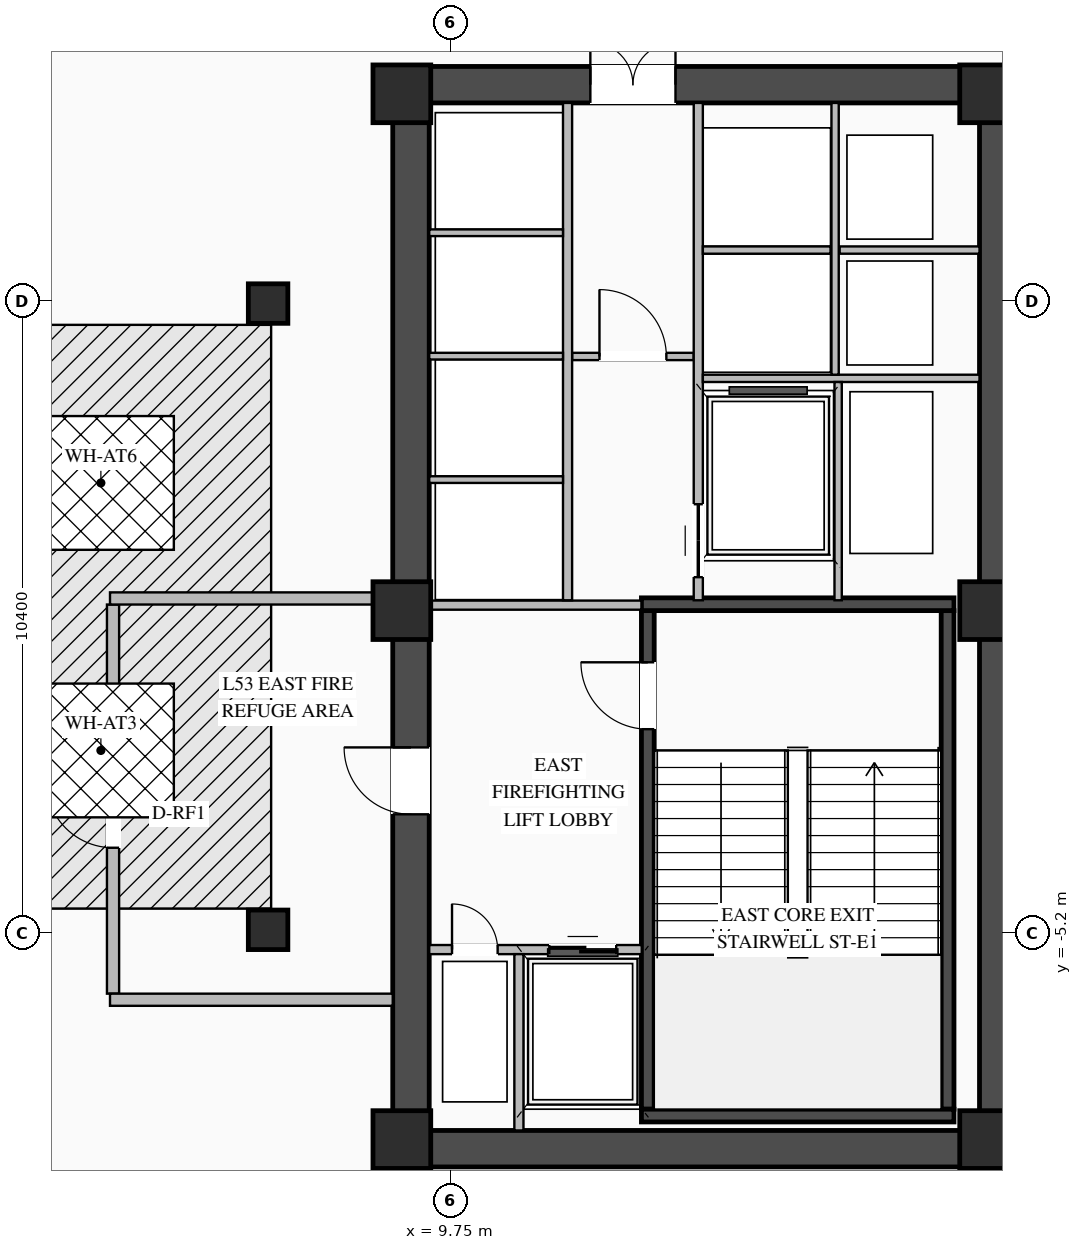
"""IFC4 building model, lengths in metres.
Left out: names, types, materials, properties, quantities, classifications, styles, units other than length and angle.
Written with IfcOpenShell. Run it as: python <this file> out.ifc"""

import sys

from ifc_helpers import new_model, si_unit, direction, frame, frame_2d, origin, origin_2d, place, context, subcontext, project, spatial, rectangle, i_section, extrude, element, fill, save


model = new_model("IFC4")
c1 = context("Model", 3, precision=1e-05, world=origin(), true_north=direction((0.0, 1.0)))
c2 = subcontext(c1, "Body", "Model", "MODEL_VIEW")
j1 = project(units=[si_unit("LENGTHUNIT", "METRE"), si_unit("PLANEANGLEUNIT", "RADIAN")], contexts=[c1])
p1 = place(None, origin())
s1 = spatial("IfcSite", under=j1, at=p1, CompositionType="ELEMENT")
p2 = place(p1, origin())
s2 = spatial("IfcBuilding", under=s1, at=p2, CompositionType="ELEMENT")
p3 = place(p2, frame((0.0, 0.0, 194.9)))
s3 = spatial("IfcBuildingStorey", under=s2, at=p3, CompositionType="ELEMENT", Elevation=194.9)
p4 = place(p3, frame((8.8, -8.75, 0.0), z_axis=(0.0, 0.0, 1.0), x_axis=(1.0, 0.0, 0.0)))
e1 = element("IfcWall", 1, at=p4, inside=s3, PredefinedType="SHEAR", context=c2, shape_type="SweptSolid", body=[
    extrude(rectangle(XDim=10.25, YDim=0.6, at=frame_2d((5.125, 0.0))), origin(), (0.0, 0.0, 1.0), 4.32),
])
p5 = place(p3, frame((8.8, 8.75, 0.0), z_axis=(0.0, 0.0, 1.0), x_axis=(1.0, 0.0, 0.0)))
e2 = element("IfcWall", 2, at=p5, inside=s3, PredefinedType="SHEAR", context=c2, shape_type="SweptSolid", body=[
    extrude(rectangle(XDim=10.25, YDim=0.6, at=frame_2d((5.125, 0.0))), origin(), (0.0, 0.0, 1.0), 4.32),
])
p6 = place(p5, frame((3.25, 0.0, 0.0)))
e3 = element("IfcOpeningElement", 3, at=p6, cuts=e2, PredefinedType="OPENING", context=c2, shape_type="SweptSolid", body=[
    extrude(rectangle(XDim=1.4, YDim=2.05, at=frame_2d((0.7, 1.025))), frame((0.0, 0.31, 0.0), z_axis=(0.0, -1.0, 0.0), x_axis=(1.0, 0.0, 0.0)), (0.0, 0.0, 1.0), 0.62),
])
p7 = place(p3, frame((9.1, -8.45, 0.0), z_axis=(0.0, 0.0, 1.0), x_axis=(0.0, 1.0, 0.0)))
e4 = element("IfcWall", 4, at=p7, inside=s3, PredefinedType="SHEAR", context=c2, shape_type="SweptSolid", body=[
    extrude(rectangle(XDim=16.9, YDim=0.6, at=frame_2d((8.45, 0.0))), origin(), (0.0, 0.0, 1.0), 4.32),
])
p8 = place(p7, frame((5.2, 0.0, 0.0)))
e5 = element("IfcOpeningElement", 5, at=p8, cuts=e4, PredefinedType="OPENING", context=c2, shape_type="SweptSolid", body=[
    extrude(rectangle(XDim=1.1, YDim=2.08, at=frame_2d((0.55, 1.04))), frame((0.0, 0.31, 0.0), z_axis=(0.0, -1.0, 0.0), x_axis=(1.0, 0.0, 0.0)), (0.0, 0.0, 1.0), 0.62),
])
p9 = place(p3, frame((18.75, -8.45, 0.0), z_axis=(0.0, 0.0, 1.0), x_axis=(0.0, 1.0, 0.0)))
e6 = element("IfcWall", 6, at=p9, inside=s3, PredefinedType="SHEAR", context=c2, shape_type="SweptSolid", body=[
    extrude(rectangle(XDim=16.9, YDim=0.6, at=frame_2d((8.45, 0.0))), origin(), (0.0, 0.0, 1.0), 4.32),
])
p10 = place(p3, frame((12.995, -8.1, 0.0), z_axis=(0.0, 0.0, 1.0), x_axis=(0.0, 1.0, 0.0)))
e7 = element("IfcWall", 7, at=p10, inside=s3, PredefinedType="SHEAR", context=c2, shape_type="SweptSolid", body=[
    extrude(rectangle(XDim=8.2, YDim=0.21, at=frame_2d((4.1, 0.0))), origin(), (0.0, 0.0, 1.0), 4.32),
])
p11 = place(p10, frame((6.25, 0.0, 0.0)))
e8 = element("IfcOpeningElement", 8, at=p11, cuts=e7, PredefinedType="OPENING", context=c2, shape_type="SweptSolid", body=[
    extrude(rectangle(XDim=1.1, YDim=2.15, at=frame_2d((0.55, 1.075))), frame((0.0, 0.115, 0.0), z_axis=(0.0, -1.0, 0.0), x_axis=(1.0, 0.0, 0.0)), (0.0, 0.0, 1.0), 0.23),
])
p12 = place(p3, frame((17.925, -8.1, 0.0), z_axis=(0.0, 0.0, 1.0), x_axis=(0.0, 1.0, 0.0)))
e9 = element("IfcWall", 9, at=p12, inside=s3, PredefinedType="SHEAR", context=c2, shape_type="SweptSolid", body=[
    extrude(rectangle(XDim=8.2, YDim=0.21, at=frame_2d((4.1, 0.0))), origin(), (0.0, 0.0, 1.0), 4.32),
])
for number, where, z_axis, x_axis in (
    (10, (12.89, -8.205, 0.0), (0.0, 0.0, 1.0), (1.0, 0.0, 0.0)),
    (11, (18.03, 0.205, 0.0), (0.0, 0.0, 1.0), (-1.0, 0.0, 0.0)),
):
    element("IfcWall", number, at=place(p3, frame(where, z_axis=z_axis, x_axis=x_axis)), inside=s3, PredefinedType="SHEAR", context=c2, shape_type="SweptSolid", body=[
        extrude(rectangle(XDim=5.14, YDim=0.21, at=frame_2d((2.57, 0.0))), origin(), (0.0, 0.0, 1.0), 4.32),
    ])
for number, where, z_axis, x_axis in (
    (12, (8.95, -8.6, 0.0), (0.0, 0.0, 1.0), (1.0, 0.0, 0.0)),
    (13, (8.95, 0.1, 0.0), (0.0, 0.0, 1.0), (1.0, 0.0, 0.0)),
    (14, (8.95, 8.6, 0.0), (0.0, 0.0, 1.0), (1.0, 0.0, 0.0)),
    (15, (18.6, -8.6, 0.0), (0.0, 0.0, 1.0), (1.0, 0.0, 0.0)),
    (16, (18.6, 0.1, 0.0), (0.0, 0.0, 1.0), (1.0, 0.0, 0.0)),
    (17, (18.6, 8.6, 0.0), (0.0, 0.0, 1.0), (1.0, 0.0, 0.0)),
):
    element("IfcColumn", number, at=place(p3, frame(where, z_axis=z_axis, x_axis=x_axis)), inside=s3, PredefinedType="COLUMN", context=c2, shape_type="SweptSolid", body=[
        extrude(rectangle(XDim=0.95, YDim=0.95, at=origin_2d()), origin(), (0.0, 0.0, 1.0), 4.6),
    ])
for number, where, z_axis, x_axis in (
    (18, (6.75, -5.15, 0.0), (0.0, 0.0, 1.0), (1.0, 0.0, 0.0)),
    (19, (6.75, 5.15, 0.0), (0.0, 0.0, 1.0), (1.0, 0.0, 0.0)),
):
    element("IfcColumn", number, at=place(p3, frame(where, z_axis=z_axis, x_axis=x_axis)), inside=s3, PredefinedType="COLUMN", context=c2, shape_type="SweptSolid", body=[
        extrude(i_section(OverallWidth=0.65, OverallDepth=0.65, WebThickness=0.028, FlangeThickness=0.04, at=origin_2d()), origin(), (0.0, 0.0, 1.0), 4.6),
    ])
p13 = place(p3, frame((9.4, -5.475, 0.0), z_axis=(0.0, 0.0, 1.0), x_axis=(1.0, 0.0, 0.0)))
e20 = element("IfcWall", 20, at=p13, inside=s3, PredefinedType="STANDARD", context=c2, shape_type="SweptSolid", body=[
    extrude(rectangle(XDim=3.495, YDim=0.15, at=frame_2d((1.748, 0.0))), origin(), (0.0, 0.0, 1.0), 4.3),
])
p14 = place(p13, frame((1.975, 0.0, 0.0)))
e21 = element("IfcOpeningElement", 21, at=p14, cuts=e20, PredefinedType="OPENING", context=c2, shape_type="SweptSolid", body=[
    extrude(rectangle(XDim=1.1, YDim=2.15, at=frame_2d((0.55, 1.075))), frame((0.0, 0.085, 0.0), z_axis=(0.0, -1.0, 0.0), x_axis=(1.0, 0.0, 0.0)), (0.0, 0.0, 1.0), 0.17),
])
p15 = place(p13, frame((0.375, 0.0, 0.0)))
e22 = element("IfcOpeningElement", 22, at=p15, cuts=e20, PredefinedType="OPENING", context=c2, shape_type="SweptSolid", body=[
    extrude(rectangle(XDim=0.75, YDim=2.05, at=frame_2d((0.375, 1.025))), frame((0.0, 0.085, 0.0), z_axis=(0.0, -1.0, 0.0), x_axis=(1.0, 0.0, 0.0)), (0.0, 0.0, 1.0), 0.17),
])
p16 = place(p3, frame((10.875, -8.45, 0.0), z_axis=(0.0, 0.0, 1.0), x_axis=(0.0, 1.0, 0.0)))
e23 = element("IfcWall", 23, at=p16, inside=s3, PredefinedType="STANDARD", context=c2, shape_type="SweptSolid", body=[
    extrude(rectangle(XDim=2.9, YDim=0.15, at=frame_2d((1.45, 0.0))), origin(), (0.0, 0.0, 1.0), 4.3),
])
p17 = place(p3, frame((9.4, 0.19, 0.0), z_axis=(0.0, 0.0, 1.0), x_axis=(1.0, 0.0, 0.0)))
e24 = element("IfcWall", 24, at=p17, inside=s3, PredefinedType="STANDARD", context=c2, shape_type="SweptSolid", body=[
    extrude(rectangle(XDim=3.49, YDim=0.15, at=frame_2d((1.745, 0.0))), origin(), (0.0, 0.0, 1.0), 3.695),
])
p18 = place(p3, frame((11.75, 4.28, 0.0), z_axis=(0.0, 0.0, 1.0), x_axis=(1.0, 0.0, 0.0)))
e25 = element("IfcWall", 25, at=p18, inside=s3, PredefinedType="STANDARD", context=c2, shape_type="SweptSolid", body=[
    extrude(rectangle(XDim=2.0, YDim=0.12, at=frame_2d((1.0, 0.0))), origin(), (0.0, 0.0, 1.0), 4.3),
])
p19 = place(p18, frame((0.45, 0.0, 0.0)))
e26 = element("IfcOpeningElement", 26, at=p19, cuts=e25, PredefinedType="OPENING", context=c2, shape_type="SweptSolid", body=[
    extrude(rectangle(XDim=1.1, YDim=2.1, at=frame_2d((0.55, 1.05))), frame((0.0, 0.07, 0.0), z_axis=(0.0, -1.0, 0.0), x_axis=(1.0, 0.0, 0.0)), (0.0, 0.0, 1.0), 0.14),
])
p20 = place(p3, frame((11.675, 0.27, 0.0), z_axis=(0.0, 0.0, 1.0), x_axis=(0.0, 1.0, 0.0)))
e27 = element("IfcWall", 27, at=p20, inside=s3, PredefinedType="STANDARD", context=c2, shape_type="SweptSolid", body=[
    extrude(rectangle(XDim=8.18, YDim=0.15, at=frame_2d((4.09, 0.0))), origin(), (0.0, 0.0, 1.0), 4.3),
])
for number, where, z_axis, x_axis in (
    (28, (9.4, 2.255, 0.0), (0.0, 0.0, 1.0), (1.0, 0.0, 0.0)),
    (29, (9.4, 4.285, 0.0), (0.0, 0.0, 1.0), (1.0, 0.0, 0.0)),
    (30, (9.4, 6.315, 0.0), (0.0, 0.0, 1.0), (1.0, 0.0, 0.0)),
):
    element("IfcWall", number, at=place(p3, frame(where, z_axis=z_axis, x_axis=x_axis)), inside=s3, PredefinedType="STANDARD", context=c2, shape_type="SweptSolid", body=[
        extrude(rectangle(XDim=2.2, YDim=0.11, at=frame_2d((1.1, 0.0))), origin(), (0.0, 0.0, 1.0), 4.3),
    ])
p21 = place(p3, frame((13.825, 0.27, 0.0), z_axis=(0.0, 0.0, 1.0), x_axis=(0.0, 1.0, 0.0)))
e31 = element("IfcWall", 31, at=p21, inside=s3, PredefinedType="STANDARD", context=c2, shape_type="SweptSolid", body=[
    extrude(rectangle(XDim=8.18, YDim=0.15, at=frame_2d((4.09, 0.0))), origin(), (0.0, 0.0, 1.0), 4.3),
])
p22 = place(p21, frame((0.38, 0.0, 0.0)))
e32 = element("IfcOpeningElement", 32, at=p22, cuts=e31, PredefinedType="OPENING", context=c2, shape_type="SweptSolid", body=[
    extrude(rectangle(XDim=1.2, YDim=2.1, at=frame_2d((0.6, 1.05))), frame((0.0, 0.085, 0.0), z_axis=(0.0, -1.0, 0.0), x_axis=(1.0, 0.0, 0.0)), (0.0, 0.0, 1.0), 0.17),
])
p23 = place(p3, frame((13.9, 3.92, 0.0), z_axis=(0.0, 0.0, 1.0), x_axis=(1.0, 0.0, 0.0)))
e33 = element("IfcWall", 33, at=p23, inside=s3, PredefinedType="STANDARD", context=c2, shape_type="SweptSolid", body=[
    extrude(rectangle(XDim=4.55, YDim=0.12, at=frame_2d((2.275, 0.0))), origin(), (0.0, 0.0, 1.0), 4.3),
])
p24 = place(p3, frame((16.15, 6.03, 0.0), z_axis=(0.0, 0.0, 1.0), x_axis=(1.0, 0.0, 0.0)))
e34 = element("IfcWall", 34, at=p24, inside=s3, PredefinedType="STANDARD", context=c2, shape_type="SweptSolid", body=[
    extrude(rectangle(XDim=2.3, YDim=0.12, at=frame_2d((1.15, 0.0))), origin(), (0.0, 0.0, 1.0), 4.3),
])
p25 = place(p3, frame((16.075, 3.98, 0.0), z_axis=(0.0, 0.0, 1.0), x_axis=(0.0, 1.0, 0.0)))
e35 = element("IfcWall", 35, at=p25, inside=s3, PredefinedType="STANDARD", context=c2, shape_type="SweptSolid", body=[
    extrude(rectangle(XDim=4.47, YDim=0.12, at=frame_2d((2.235, 0.0))), origin(), (0.0, 0.0, 1.0), 4.3),
])
p26 = place(p3, frame((13.9, 6.03, 0.0), z_axis=(0.0, 0.0, 1.0), x_axis=(1.0, 0.0, 0.0)))
e36 = element("IfcWall", 36, at=p26, inside=s3, PredefinedType="STANDARD", context=c2, shape_type="SweptSolid", body=[
    extrude(rectangle(XDim=2.1, YDim=0.12, at=frame_2d((1.05, 0.0))), origin(), (0.0, 0.0, 1.0), 4.3),
])
p27 = place(p3, frame((16.125, 0.27, 0.0), z_axis=(0.0, 0.0, 1.0), x_axis=(0.0, 1.0, 0.0)))
e37 = element("IfcWall", 37, at=p27, inside=s3, PredefinedType="STANDARD", context=c2, shape_type="SweptSolid", body=[
    extrude(rectangle(XDim=3.59, YDim=0.12, at=frame_2d((1.795, 0.0))), origin(), (0.0, 0.0, 1.0), 4.3),
])
p28 = place(p3, frame((4.2, -6.2, 0.0), z_axis=(0.0, 0.0, 1.0), x_axis=(0.0, 1.0, 0.0)))
e38 = element("IfcWall", 38, at=p28, inside=s3, PredefinedType="STANDARD", context=c2, shape_type="SweptSolid", body=[
    extrude(rectangle(XDim=6.4, YDim=0.2, at=frame_2d((3.2, 0.0))), origin(), (0.0, 0.0, 1.0), 4.3),
])
p29 = place(p28, frame((2.4, 0.0, 0.0)))
e39 = element("IfcOpeningElement", 39, at=p29, cuts=e38, PredefinedType="OPENING", context=c2, shape_type="SweptSolid", body=[
    extrude(rectangle(XDim=1.1, YDim=2.08, at=frame_2d((0.55, 1.04))), frame((0.0, 0.11, 0.0), z_axis=(0.0, -1.0, 0.0), x_axis=(1.0, 0.0, 0.0)), (0.0, 0.0, 1.0), 0.22),
])
p30 = place(p3, frame((4.15, -6.3, 0.0), z_axis=(0.0, 0.0, 1.0), x_axis=(1.0, 0.0, 0.0)))
e40 = element("IfcWall", 40, at=p30, inside=s3, PredefinedType="STANDARD", context=c2, shape_type="SweptSolid", body=[
    extrude(rectangle(XDim=4.65, YDim=0.2, at=frame_2d((2.325, 0.0))), origin(), (0.0, 0.0, 1.0), 4.3),
])
p31 = place(p3, frame((4.15, 0.3, 0.0), z_axis=(0.0, 0.0, 1.0), x_axis=(1.0, 0.0, 0.0)))
e41 = element("IfcWall", 41, at=p31, inside=s3, PredefinedType="STANDARD", context=c2, shape_type="SweptSolid", body=[
    extrude(rectangle(XDim=4.65, YDim=0.2, at=frame_2d((2.325, 0.0))), origin(), (0.0, 0.0, 1.0), 2.795),
])
p32 = place(p3, frame((0.0, 0.0, -0.26)))
p33 = place(p32, frame((4.0, -2.2, 0.21)))
e42 = element("IfcWindow", 42, at=p33, inside=s3, PartitioningType="SINGLE_PANEL", PredefinedType="SKYLIGHT", context=c2, shape_type="SweptSolid", body=[
    extrude(rectangle(XDim=2.4, YDim=2.2, at=origin_2d()), origin(), (0.0, 0.0, 1.0), 0.05),
])
p34 = place(p32, frame((4.0, 2.2, 0.21)))
e43 = element("IfcWindow", 43, at=p34, inside=s3, PartitioningType="SINGLE_PANEL", PredefinedType="SKYLIGHT", context=c2, shape_type="SweptSolid", body=[
    extrude(rectangle(XDim=2.4, YDim=2.2, at=origin_2d()), origin(), (0.0, 0.0, 1.0), 0.05),
])
p35 = place(p11, origin())
e44 = element("IfcDoor", 44, at=p35, inside=s3, OperationType="SINGLE_SWING_RIGHT", PredefinedType="DOOR", context=c2, shape_type="SweptSolid", body=[
    extrude(rectangle(XDim=1.1, YDim=2.15, at=frame_2d((0.55, 1.075))), frame((0.0, 0.025, 0.0), z_axis=(0.0, -1.0, 0.0), x_axis=(1.0, 0.0, 0.0)), (0.0, 0.0, 1.0), 0.05),
])
fill(e8, e44)
p36 = place(p14, origin())
e45 = element("IfcDoor", 45, at=p36, inside=s3, OperationType="DOUBLE_DOOR_SLIDING", PredefinedType="DOOR", context=c2, shape_type="SweptSolid", body=[
    extrude(rectangle(XDim=1.1, YDim=2.15, at=frame_2d((0.55, 1.075))), frame((0.0, 0.025, 0.0), z_axis=(0.0, -1.0, 0.0), x_axis=(1.0, 0.0, 0.0)), (0.0, 0.0, 1.0), 0.05),
])
fill(e21, e45)
p37 = place(p15, origin())
e46 = element("IfcDoor", 46, at=p37, inside=s3, OperationType="SINGLE_SWING_LEFT", PredefinedType="DOOR", context=c2, shape_type="SweptSolid", body=[
    extrude(rectangle(XDim=0.75, YDim=2.05, at=frame_2d((0.375, 1.025))), frame((0.0, 0.025, 0.0), z_axis=(0.0, -1.0, 0.0), x_axis=(1.0, 0.0, 0.0)), (0.0, 0.0, 1.0), 0.05),
])
fill(e22, e46)
p38 = place(p8, origin())
e47 = element("IfcDoor", 47, at=p38, inside=s3, OperationType="SINGLE_SWING_RIGHT", PredefinedType="DOOR", context=c2, shape_type="SweptSolid", body=[
    extrude(rectangle(XDim=1.1, YDim=2.08, at=frame_2d((0.55, 1.04))), frame((0.0, -0.205, 0.0), z_axis=(0.0, -1.0, 0.0), x_axis=(1.0, 0.0, 0.0)), (0.0, 0.0, 1.0), 0.05),
])
fill(e5, e47)
p39 = place(p19, origin())
e48 = element("IfcDoor", 48, at=p39, inside=s3, OperationType="SINGLE_SWING_LEFT", PredefinedType="DOOR", context=c2, shape_type="SweptSolid", body=[
    extrude(rectangle(XDim=1.1, YDim=2.1, at=frame_2d((0.55, 1.05))), frame((0.0, 0.025, 0.0), z_axis=(0.0, -1.0, 0.0), x_axis=(1.0, 0.0, 0.0)), (0.0, 0.0, 1.0), 0.05),
])
fill(e26, e48)
p40 = place(p6, origin())
e49 = element("IfcDoor", 49, at=p40, inside=s3, OperationType="DOUBLE_DOOR_SINGLE_SWING", PredefinedType="DOOR", context=c2, shape_type="SweptSolid", body=[
    extrude(rectangle(XDim=1.4, YDim=2.05, at=frame_2d((0.7, 1.025))), frame((0.0, 0.245, 0.0), z_axis=(0.0, -1.0, 0.0), x_axis=(1.0, 0.0, 0.0)), (0.0, 0.0, 1.0), 0.05),
])
fill(e3, e49)
p41 = place(p22, origin())
e50 = element("IfcDoor", 50, at=p41, inside=s3, OperationType="DOUBLE_DOOR_SLIDING", PredefinedType="DOOR", context=c2, shape_type="SweptSolid", body=[
    extrude(rectangle(XDim=1.2, YDim=2.1, at=frame_2d((0.6, 1.05))), frame((0.0, 0.025, 0.0), z_axis=(0.0, -1.0, 0.0), x_axis=(1.0, 0.0, 0.0)), (0.0, 0.0, 1.0), 0.05),
])
fill(e32, e50)
p42 = place(p29, origin())
e51 = element("IfcDoor", 51, at=p42, inside=s3, OperationType="SINGLE_SWING_RIGHT", PredefinedType="DOOR", context=c2, shape_type="SweptSolid", body=[
    extrude(rectangle(XDim=1.1, YDim=2.08, at=frame_2d((0.55, 1.04))), frame((0.0, 0.025, 0.0), z_axis=(0.0, -1.0, 0.0), x_axis=(1.0, 0.0, 0.0)), (0.0, 0.0, 1.0), 0.05),
])
fill(e39, e51)
save(model, sys.argv[1])
